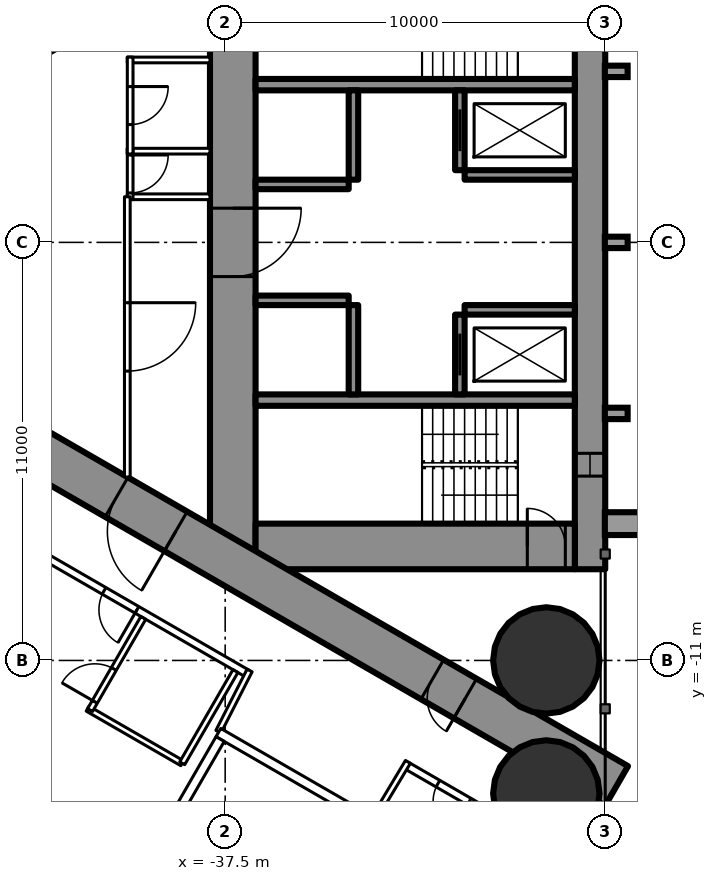
"""IFC4 building model, lengths in metres.
Left out: names, types, materials, properties, quantities, classifications, styles, units other than length and angle.
Written with IfcOpenShell. Run it as: python <this file> out.ifc"""

import sys

from ifc_helpers import new_model, si_unit, direction, frame, frame_2d, origin, origin_2d, place, context, subcontext, project, spatial, rectangle, hollow_circle, extrude, element, fill, save


model = new_model("IFC4")
c1 = context("Model", 3, precision=1e-05, world=origin(), true_north=direction((0.0, 1.0)))
c2 = subcontext(c1, "Body", "Model", "MODEL_VIEW")
j1 = project(units=[si_unit("LENGTHUNIT", "METRE"), si_unit("PLANEANGLEUNIT", "RADIAN")], contexts=[c1])
p1 = place(None, origin())
s1 = spatial("IfcSite", under=j1, at=p1, CompositionType="ELEMENT")
p2 = place(p1, origin())
s2 = spatial("IfcBuilding", under=s1, at=p2, CompositionType="ELEMENT")
p3 = place(p2, frame((0.0, 0.0, 56.5)))
s3 = spatial("IfcBuildingStorey", under=s2, at=p3, CompositionType="ELEMENT", Elevation=56.5)
for number, where, z_axis, x_axis in (
    (1, (-29.05, -11.0, 0.0), (0.0, 0.0, 1.0), (1.0, 0.0, 0.0)),
    (2, (-29.05, -14.5, 0.0), (0.0, 0.0, 1.0), (1.0, 0.0, 0.0)),
):
    element("IfcColumn", number, at=place(p3, frame(where, z_axis=z_axis, x_axis=x_axis)), inside=s3, PredefinedType="COLUMN", context=c2, shape_type="SweptSolid", body=[
        extrude(hollow_circle(Radius=1.4, WallThickness=0.12, at=origin_2d()), origin(), (0.0, 0.0, 1.0), 3.5),
    ])
p4 = place(p3, frame((-27.9, 8.6, 0.0), z_axis=(0.0, 0.0, 1.0), x_axis=(0.0, -1.0, 0.0)))
e3 = element("IfcWall", 3, at=p4, inside=s3, PredefinedType="SHEAR", context=c2, shape_type="SweptSolid", body=[
    extrude(rectangle(XDim=17.2, YDim=0.8, at=frame_2d((8.6, 0.0))), origin(), (0.0, 0.0, 1.0), 3.5),
])
p5 = place(p4, frame((2.45, 0.0, 0.6)))
e4 = element("IfcOpeningElement", 4, at=p5, cuts=e3, PredefinedType="OPENING", context=c2, shape_type="SweptSolid", body=[
    extrude(rectangle(XDim=0.6, YDim=2.1, at=frame_2d((0.3, 1.05))), frame((0.0, 0.41, 0.0), z_axis=(0.0, -1.0, 0.0), x_axis=(1.0, 0.0, 0.0)), (0.0, 0.0, 1.0), 0.82),
])
p6 = place(p4, frame((14.15, 0.0, 0.6)))
e5 = element("IfcOpeningElement", 5, at=p6, cuts=e3, PredefinedType="OPENING", context=c2, shape_type="SweptSolid", body=[
    extrude(rectangle(XDim=0.6, YDim=2.1, at=frame_2d((0.3, 1.05))), frame((0.0, 0.41, 0.0), z_axis=(0.0, -1.0, 0.0), x_axis=(1.0, 0.0, 0.0)), (0.0, 0.0, 1.0), 0.82),
])
p7 = place(p3, frame((-37.3, 8.6, 0.0), z_axis=(0.0, 0.0, 1.0), x_axis=(0.0, -1.0, 0.0)))
e6 = element("IfcWall", 6, at=p7, inside=s3, PredefinedType="SHEAR", context=c2, shape_type="SweptSolid", body=[
    extrude(rectangle(XDim=17.2, YDim=1.2, at=frame_2d((8.6, 0.0))), origin(), (0.0, 0.0, 1.0), 3.5),
])
p8 = place(p7, frame((7.7, 0.0, 0.0)))
e7 = element("IfcOpeningElement", 7, at=p8, cuts=e6, PredefinedType="OPENING", context=c2, shape_type="SweptSolid", body=[
    extrude(rectangle(XDim=1.8, YDim=2.2, at=frame_2d((0.9, 1.1))), frame((0.0, 0.61, 0.0), z_axis=(0.0, -1.0, 0.0), x_axis=(1.0, 0.0, 0.0)), (0.0, 0.0, 1.0), 1.22),
])
p9 = place(p3, frame((-28.3, -8.0, 0.0), z_axis=(0.0, 0.0, 1.0), x_axis=(-1.0, 0.0, 0.0)))
e8 = element("IfcWall", 8, at=p9, inside=s3, PredefinedType="SHEAR", context=c2, shape_type="SweptSolid", body=[
    extrude(rectangle(XDim=8.4, YDim=1.2, at=frame_2d((4.2, 0.0))), origin(), (0.0, 0.0, 1.0), 3.5),
])
p10 = place(p9, frame((0.25, 0.0, 0.0)))
e9 = element("IfcOpeningElement", 9, at=p10, cuts=e8, PredefinedType="OPENING", context=c2, shape_type="SweptSolid", body=[
    extrude(rectangle(XDim=1.0, YDim=2.2, at=frame_2d((0.5, 1.1))), frame((0.0, 0.61, 0.0), z_axis=(0.0, -1.0, 0.0), x_axis=(1.0, 0.0, 0.0)), (0.0, 0.0, 1.0), 1.22),
])
for number, where, z_axis, x_axis in (
    (10, (-28.3, 4.15, 0.0), (0.0, 0.0, 1.0), (-1.0, 0.0, 0.0)),
    (11, (-28.3, -4.15, 0.0), (0.0, 0.0, 1.0), (-1.0, 0.0, 0.0)),
):
    element("IfcWall", number, at=place(p3, frame(where, z_axis=z_axis, x_axis=x_axis)), inside=s3, PredefinedType="SHEAR", context=c2, shape_type="SweptSolid", body=[
        extrude(rectangle(XDim=8.4, YDim=0.3, at=frame_2d((4.2, 0.0))), origin(), (0.0, 0.0, 1.0), 3.5),
    ])
p11 = place(p3, frame((-31.325, 4.0, 0.0), z_axis=(0.0, 0.0, 1.0), x_axis=(0.0, -1.0, 0.0)))
e12 = element("IfcWall", 12, at=p11, inside=s3, PredefinedType="SHEAR", context=c2, shape_type="SweptSolid", body=[
    extrude(rectangle(XDim=2.1, YDim=0.25, at=frame_2d((1.05, 0.0))), origin(), (0.0, 0.0, 1.0), 3.5),
])
p12 = place(p11, frame((0.5, 0.0, 0.0)))
e13 = element("IfcOpeningElement", 13, at=p12, cuts=e12, PredefinedType="OPENING", context=c2, shape_type="SweptSolid", body=[
    extrude(rectangle(XDim=1.1, YDim=2.2, at=frame_2d((0.55, 1.1))), frame((0.0, 0.135, 0.0), z_axis=(0.0, -1.0, 0.0), x_axis=(1.0, 0.0, 0.0)), (0.0, 0.0, 1.0), 0.27),
])
p13 = place(p3, frame((-34.125, 4.0, 0.0), z_axis=(0.0, 0.0, 1.0), x_axis=(0.0, -1.0, 0.0)))
e14 = element("IfcWall", 14, at=p13, inside=s3, PredefinedType="SHEAR", context=c2, shape_type="SweptSolid", body=[
    extrude(rectangle(XDim=2.35, YDim=0.25, at=frame_2d((1.175, 0.0))), origin(), (0.0, 0.0, 1.0), 3.5),
])
p14 = place(p3, frame((-28.3, 1.775, 0.0), z_axis=(0.0, 0.0, 1.0), x_axis=(-1.0, 0.0, 0.0)))
e15 = element("IfcWall", 15, at=p14, inside=s3, PredefinedType="SHEAR", context=c2, shape_type="SweptSolid", body=[
    extrude(rectangle(XDim=2.9, YDim=0.25, at=frame_2d((1.45, 0.0))), origin(), (0.0, 0.0, 1.0), 3.5),
])
p15 = place(p3, frame((-34.25, 1.525, 0.0), z_axis=(0.0, 0.0, 1.0), x_axis=(-1.0, 0.0, 0.0)))
e16 = element("IfcWall", 16, at=p15, inside=s3, PredefinedType="SHEAR", context=c2, shape_type="SweptSolid", body=[
    extrude(rectangle(XDim=2.45, YDim=0.25, at=frame_2d((1.225, 0.0))), origin(), (0.0, 0.0, 1.0), 3.5),
])
p16 = place(p3, frame((-31.325, -1.9, 0.0), z_axis=(0.0, 0.0, 1.0), x_axis=(0.0, -1.0, 0.0)))
e17 = element("IfcWall", 17, at=p16, inside=s3, PredefinedType="SHEAR", context=c2, shape_type="SweptSolid", body=[
    extrude(rectangle(XDim=2.1, YDim=0.25, at=frame_2d((1.05, 0.0))), origin(), (0.0, 0.0, 1.0), 3.5),
])
p17 = place(p16, frame((0.5, 0.0, 0.0)))
e18 = element("IfcOpeningElement", 18, at=p17, cuts=e17, PredefinedType="OPENING", context=c2, shape_type="SweptSolid", body=[
    extrude(rectangle(XDim=1.1, YDim=2.2, at=frame_2d((0.55, 1.1))), frame((0.0, 0.135, 0.0), z_axis=(0.0, -1.0, 0.0), x_axis=(1.0, 0.0, 0.0)), (0.0, 0.0, 1.0), 0.27),
])
p18 = place(p3, frame((-34.125, -1.65, 0.0), z_axis=(0.0, 0.0, 1.0), x_axis=(0.0, -1.0, 0.0)))
e19 = element("IfcWall", 19, at=p18, inside=s3, PredefinedType="SHEAR", context=c2, shape_type="SweptSolid", body=[
    extrude(rectangle(XDim=2.35, YDim=0.25, at=frame_2d((1.175, 0.0))), origin(), (0.0, 0.0, 1.0), 3.5),
])
p19 = place(p3, frame((-28.3, -1.775, 0.0), z_axis=(0.0, 0.0, 1.0), x_axis=(-1.0, 0.0, 0.0)))
e20 = element("IfcWall", 20, at=p19, inside=s3, PredefinedType="SHEAR", context=c2, shape_type="SweptSolid", body=[
    extrude(rectangle(XDim=2.9, YDim=0.25, at=frame_2d((1.45, 0.0))), origin(), (0.0, 0.0, 1.0), 3.5),
])
p20 = place(p3, frame((-34.25, -1.525, 0.0), z_axis=(0.0, 0.0, 1.0), x_axis=(-1.0, 0.0, 0.0)))
e21 = element("IfcWall", 21, at=p20, inside=s3, PredefinedType="SHEAR", context=c2, shape_type="SweptSolid", body=[
    extrude(rectangle(XDim=2.45, YDim=0.25, at=frame_2d((1.225, 0.0))), origin(), (0.0, 0.0, 1.0), 3.5),
])
p21 = place(p3, frame((-27.2, 14.3, 0.0), z_axis=(0.0, 0.0, 1.0), x_axis=(-0.866026593062, -0.499997940104, 0.0)))
e22 = element("IfcWall", 22, at=p21, inside=s3, PredefinedType="SHEAR", context=c2, shape_type="SweptSolid", body=[
    extrude(rectangle(XDim=28.946, YDim=1.2, at=frame_2d((14.473, 0.0))), origin(), (0.0, 0.0, 1.0), 3.5),
])
p22 = place(p21, frame((4.6, 0.0, 0.0)))
e23 = element("IfcOpeningElement", 23, at=p22, cuts=e22, PredefinedType="OPENING", context=c2, shape_type="SweptSolid", body=[
    extrude(rectangle(XDim=1.0, YDim=2.2, at=frame_2d((0.5, 1.1))), frame((0.0, 0.61, 0.0), z_axis=(0.0, -1.0, 0.0), x_axis=(1.0, 0.0, 0.0)), (0.0, 0.0, 1.0), 1.22),
])
p23 = place(p21, frame((13.395, 0.0, 0.0)))
e24 = element("IfcOpeningElement", 24, at=p23, cuts=e22, PredefinedType="OPENING", context=c2, shape_type="SweptSolid", body=[
    extrude(rectangle(XDim=1.8, YDim=2.2, at=frame_2d((0.9, 1.1))), frame((0.0, 0.61, 0.0), z_axis=(0.0, -1.0, 0.0), x_axis=(1.0, 0.0, 0.0)), (0.0, 0.0, 1.0), 1.22),
])
p24 = place(p3, frame((-27.2, -14.3, 0.0), z_axis=(0.0, 0.0, 1.0), x_axis=(-0.866024021859, 0.500002393557, 0.0)))
e25 = element("IfcWall", 25, at=p24, inside=s3, PredefinedType="SHEAR", context=c2, shape_type="SweptSolid", body=[
    extrude(rectangle(XDim=27.907, YDim=1.2, at=frame_2d((13.954, 0.0))), origin(), (0.0, 0.0, 1.0), 3.5),
])
p25 = place(p24, frame((4.6, 0.0, 0.0)))
e26 = element("IfcOpeningElement", 26, at=p25, cuts=e25, PredefinedType="OPENING", context=c2, shape_type="SweptSolid", body=[
    extrude(rectangle(XDim=1.0, YDim=2.2, at=frame_2d((0.5, 1.1))), frame((0.0, 0.61, 0.0), z_axis=(0.0, -1.0, 0.0), x_axis=(1.0, 0.0, 0.0)), (0.0, 0.0, 1.0), 1.22),
])
p26 = place(p24, frame((13.395, 0.0, 0.0)))
e27 = element("IfcOpeningElement", 27, at=p26, cuts=e25, PredefinedType="OPENING", context=c2, shape_type="SweptSolid", body=[
    extrude(rectangle(XDim=1.8, YDim=2.2, at=frame_2d((0.9, 1.1))), frame((0.0, 0.61, 0.0), z_axis=(0.0, -1.0, 0.0), x_axis=(1.0, 0.0, 0.0)), (0.0, 0.0, 1.0), 1.22),
])
p27 = place(p3, frame((-37.7, 10.894, 0.0), z_axis=(0.0, 0.0, 1.0), x_axis=(-0.866027905338, -0.499995667157, 0.0)))
e28 = element("IfcWall", 28, at=p27, inside=s3, PredefinedType="PARTITIONING", context=c2, shape_type="SweptSolid", body=[
    extrude(rectangle(XDim=21.787, YDim=0.2, at=frame_2d((10.894, 0.0))), origin(), (0.0, 0.0, 1.0), 3.25),
])
p28 = place(p27, frame((20.237, 0.0, 0.0)))
e29 = element("IfcOpeningElement", 29, at=p28, cuts=e28, PredefinedType="OPENING", context=c2, shape_type="SweptSolid", body=[
    extrude(rectangle(XDim=0.95, YDim=2.2, at=frame_2d((0.475, 1.1))), frame((0.0, 0.11, 0.0), z_axis=(0.0, -1.0, 0.0), x_axis=(1.0, 0.0, 0.0)), (0.0, 0.0, 1.0), 0.22),
])
p29 = place(p27, frame((7.73, 0.0, 0.0)))
e30 = element("IfcOpeningElement", 30, at=p29, cuts=e28, PredefinedType="OPENING", context=c2, shape_type="SweptSolid", body=[
    extrude(rectangle(XDim=0.95, YDim=2.2, at=frame_2d((0.475, 1.1))), frame((0.0, 0.11, 0.0), z_axis=(0.0, -1.0, 0.0), x_axis=(1.0, 0.0, 0.0)), (0.0, 0.0, 1.0), 0.22),
])
p30 = place(p3, frame((-27.572, -16.741, 0.0), z_axis=(0.0, 0.0, 1.0), x_axis=(-0.866024464444, 0.500001626982, 0.0)))
e31 = element("IfcWall", 31, at=p30, inside=s3, PredefinedType="PARTITIONING", context=c2, shape_type="SweptSolid", body=[
    extrude(rectangle(XDim=5.955, YDim=0.2, at=frame_2d((2.978, 0.0))), origin(), (0.0, 0.0, 1.0), 3.25),
])
p31 = place(p30, frame((4.05, 0.0, 0.0)))
e32 = element("IfcOpeningElement", 32, at=p31, cuts=e31, PredefinedType="OPENING", context=c2, shape_type="SweptSolid", body=[
    extrude(rectangle(XDim=0.95, YDim=2.2, at=frame_2d((0.475, 1.1))), frame((0.0, 0.11, 0.0), z_axis=(0.0, -1.0, 0.0), x_axis=(1.0, 0.0, 0.0)), (0.0, 0.0, 1.0), 0.22),
])
p32 = place(p3, frame((-36.92, -11.344, 0.0), z_axis=(0.0, 0.0, 1.0), x_axis=(-0.866028313256, 0.499994960614, 0.0)))
e33 = element("IfcWall", 33, at=p32, inside=s3, PredefinedType="PARTITIONING", context=c2, shape_type="SweptSolid", body=[
    extrude(rectangle(XDim=22.568, YDim=0.2, at=frame_2d((11.284, 0.0))), origin(), (0.0, 0.0, 1.0), 3.25),
])
p33 = place(p32, frame((12.68, 0.0, 0.0)))
e34 = element("IfcOpeningElement", 34, at=p33, cuts=e33, PredefinedType="OPENING", context=c2, shape_type="SweptSolid", body=[
    extrude(rectangle(XDim=0.95, YDim=2.2, at=frame_2d((0.475, 1.1))), frame((0.0, 0.11, 0.0), z_axis=(0.0, -1.0, 0.0), x_axis=(1.0, 0.0, 0.0)), (0.0, 0.0, 1.0), 0.22),
])
p34 = place(p32, frame((3.35, 0.0, 0.0)))
e35 = element("IfcOpeningElement", 35, at=p34, cuts=e33, PredefinedType="OPENING", context=c2, shape_type="SweptSolid", body=[
    extrude(rectangle(XDim=1.0, YDim=2.2, at=frame_2d((0.5, 1.1))), frame((0.0, 0.11, 0.0), z_axis=(0.0, -1.0, 0.0), x_axis=(1.0, 0.0, 0.0)), (0.0, 0.0, 1.0), 0.22),
])
p35 = place(p3, frame((-36.857, -11.265, 0.0), z_axis=(0.0, 0.0, 1.0), x_axis=(-0.454225294761, -0.890886851176, 0.0)))
e36 = element("IfcWall", 36, at=p35, inside=s3, PredefinedType="PARTITIONING", context=c2, shape_type="SweptSolid", body=[
    extrude(rectangle(XDim=1.807, YDim=0.15, at=frame_2d((0.904, 0.0))), origin(), (0.0, 0.0, 1.0), 3.25),
])
p36 = place(p3, frame((-33.621, -15.218, 0.0), z_axis=(0.0, 0.0, 1.0), x_axis=(0.514336634837, 0.857588377991, 0.0)))
e37 = element("IfcWall", 37, at=p36, inside=s3, PredefinedType="PARTITIONING", context=c2, shape_type="SweptSolid", body=[
    extrude(rectangle(XDim=1.805, YDim=0.15, at=frame_2d((0.903, 0.0))), origin(), (0.0, 0.0, 1.0), 3.25),
])
p37 = place(p3, frame((-38.63, -13.705, 0.0), z_axis=(0.0, 0.0, 1.0), x_axis=(-0.866018712932, 0.500011588718, 0.0)))
e38 = element("IfcWall", 38, at=p37, inside=s3, PredefinedType="PARTITIONING", context=c2, shape_type="SweptSolid", body=[
    extrude(rectangle(XDim=2.875, YDim=0.15, at=frame_2d((1.438, 0.0))), origin(), (0.0, 0.0, 1.0), 3.25),
])
p38 = place(p3, frame((-39.655, -9.88, 0.0), z_axis=(0.0, 0.0, 1.0), x_axis=(-0.500049511043, -0.865996816683, 0.0)))
e39 = element("IfcWall", 39, at=p38, inside=s3, PredefinedType="PARTITIONING", context=c2, shape_type="SweptSolid", body=[
    extrude(rectangle(XDim=2.8, YDim=0.15, at=frame_2d((1.4, 0.0))), origin(), (0.0, 0.0, 1.0), 3.25),
])
p39 = place(p38, frame((1.55, 0.0, 0.0)))
e40 = element("IfcOpeningElement", 40, at=p39, cuts=e39, PredefinedType="OPENING", context=c2, shape_type="SweptSolid", body=[
    extrude(rectangle(XDim=1.0, YDim=2.2, at=frame_2d((0.5, 1.1))), frame((0.0, 0.085, 0.0), z_axis=(0.0, -1.0, 0.0), x_axis=(1.0, 0.0, 0.0)), (0.0, 0.0, 1.0), 0.17),
])
p40 = place(p3, frame((-37.23, -11.281, 0.0), z_axis=(0.0, 0.0, 1.0), x_axis=(-0.500049511043, -0.865996816683, 0.0)))
e41 = element("IfcWall", 41, at=p40, inside=s3, PredefinedType="PARTITIONING", context=c2, shape_type="SweptSolid", body=[
    extrude(rectangle(XDim=2.8, YDim=0.15, at=frame_2d((1.4, 0.0))), origin(), (0.0, 0.0, 1.0), 3.25),
])
for number, where, z_axis, x_axis in (
    (42, (-37.9, 1.2, 0.0), (0.0, 0.0, 1.0), (-1.0, 0.0, 0.0)),
    (43, (-37.9, 2.4, 0.0), (0.0, 0.0, 1.0), (-1.0, 0.0, 0.0)),
    (44, (-37.9, 4.8, 0.0), (0.0, 0.0, 1.0), (-1.0, 0.0, 0.0)),
):
    element("IfcWall", number, at=place(p3, frame(where, z_axis=z_axis, x_axis=x_axis)), inside=s3, PredefinedType="PARTITIONING", context=c2, shape_type="SweptSolid", body=[
        extrude(rectangle(XDim=2.175, YDim=0.15, at=frame_2d((1.087, 0.0))), origin(), (0.0, 0.0, 1.0), 3.25),
    ])
p41 = place(p3, frame((-40.0, 2.475, 0.0), z_axis=(0.0, 0.0, 1.0), x_axis=(0.0, -1.0, 0.0)))
e45 = element("IfcWall", 45, at=p41, inside=s3, PredefinedType="PARTITIONING", context=c2, shape_type="SweptSolid", body=[
    extrude(rectangle(XDim=1.35, YDim=0.15, at=frame_2d((0.675, 0.0))), origin(), (0.0, 0.0, 1.0), 3.25),
])
p42 = place(p41, frame((0.175, 0.0, 0.0)))
e46 = element("IfcOpeningElement", 46, at=p42, cuts=e45, PredefinedType="OPENING", context=c2, shape_type="SweptSolid", body=[
    extrude(rectangle(XDim=1.0, YDim=2.2, at=frame_2d((0.5, 1.1))), frame((0.0, 0.085, 0.0), z_axis=(0.0, -1.0, 0.0), x_axis=(1.0, 0.0, 0.0)), (0.0, 0.0, 1.0), 0.17),
])
p43 = place(p3, frame((-40.0, 4.875, 0.0), z_axis=(0.0, 0.0, 1.0), x_axis=(0.0, -1.0, 0.0)))
e47 = element("IfcWall", 47, at=p43, inside=s3, PredefinedType="PARTITIONING", context=c2, shape_type="SweptSolid", body=[
    extrude(rectangle(XDim=2.55, YDim=0.15, at=frame_2d((1.275, 0.0))), origin(), (0.0, 0.0, 1.0), 3.25),
])
p44 = place(p43, frame((0.775, 0.0, 0.0)))
e48 = element("IfcOpeningElement", 48, at=p44, cuts=e47, PredefinedType="OPENING", context=c2, shape_type="SweptSolid", body=[
    extrude(rectangle(XDim=1.0, YDim=2.2, at=frame_2d((0.5, 1.1))), frame((0.0, 0.085, 0.0), z_axis=(0.0, -1.0, 0.0), x_axis=(1.0, 0.0, 0.0)), (0.0, 0.0, 1.0), 0.17),
])
p45 = place(p3, frame((-40.075, 1.2, 0.0), z_axis=(0.0, 0.0, 1.0), x_axis=(0.0, -1.0, 0.0)))
e49 = element("IfcWall", 49, at=p45, inside=s3, PredefinedType="PARTITIONING", context=c2, shape_type="SweptSolid", body=[
    extrude(rectangle(XDim=7.374, YDim=0.15, at=frame_2d((3.687, 0.0))), origin(), (0.0, 0.0, 1.0), 3.25),
])
p46 = place(p45, frame((2.787, 0.0, 0.0)))
e50 = element("IfcOpeningElement", 50, at=p46, cuts=e49, PredefinedType="OPENING", context=c2, shape_type="SweptSolid", body=[
    extrude(rectangle(XDim=1.8, YDim=2.2, at=frame_2d((0.9, 1.1))), frame((0.0, 0.085, 0.0), z_axis=(0.0, -1.0, 0.0), x_axis=(1.0, 0.0, 0.0)), (0.0, 0.0, 1.0), 0.17),
])
p47 = place(p3, frame((-33.696, -15.197, 0.0), z_axis=(0.0, 0.0, 1.0), x_axis=(-0.865976953817, 0.500083908417, 0.0)))
e51 = element("IfcWall", 51, at=p47, inside=s3, PredefinedType="PARTITIONING", context=c2, shape_type="SweptSolid", body=[
    extrude(rectangle(XDim=4.599, YDim=0.25, at=frame_2d((2.3, 0.0))), origin(), (0.0, 0.0, 1.0), 3.25),
])
p48 = place(p3, frame((-37.633, -13.068, 0.0), z_axis=(0.0, 0.0, 1.0), x_axis=(-0.499872130319, -0.866099216793, 0.0)))
e52 = element("IfcWall", 52, at=p48, inside=s3, PredefinedType="PARTITIONING", context=c2, shape_type="SweptSolid", body=[
    extrude(rectangle(XDim=3.2, YDim=0.25, at=frame_2d((1.6, 0.0))), origin(), (0.0, 0.0, 1.0), 3.25),
])
p49 = place(p39, origin())
e53 = element("IfcDoor", 53, at=p49, inside=s3, OperationType="SINGLE_SWING_RIGHT", PredefinedType="DOOR", context=c2, shape_type="SweptSolid", body=[
    extrude(rectangle(XDim=1.0, YDim=2.2, at=frame_2d((0.5, 1.1))), frame((0.0, 0.025, 0.0), z_axis=(0.0, -1.0, 0.0), x_axis=(1.0, 0.0, 0.0)), (0.0, 0.0, 1.0), 0.05),
])
fill(e40, e53)
p50 = place(p34, origin())
e54 = element("IfcDoor", 54, at=p50, inside=s3, OperationType="SINGLE_SWING_LEFT", PredefinedType="DOOR", context=c2, shape_type="SweptSolid", body=[
    extrude(rectangle(XDim=1.0, YDim=2.2, at=frame_2d((0.5, 1.1))), frame((0.0, 0.025, 0.0), z_axis=(0.0, -1.0, 0.0), x_axis=(1.0, 0.0, 0.0)), (0.0, 0.0, 1.0), 0.05),
])
fill(e35, e54)
p51 = place(p31, origin())
e55 = element("IfcDoor", 55, at=p51, inside=s3, OperationType="SINGLE_SWING_LEFT", PredefinedType="DOOR", context=c2, shape_type="SweptSolid", body=[
    extrude(rectangle(XDim=0.95, YDim=2.2, at=frame_2d((0.475, 1.1))), frame((0.0, 0.025, 0.0), z_axis=(0.0, -1.0, 0.0), x_axis=(1.0, 0.0, 0.0)), (0.0, 0.0, 1.0), 0.05),
])
fill(e32, e55)
p52 = place(p42, origin())
e56 = element("IfcDoor", 56, at=p52, inside=s3, OperationType="SINGLE_SWING_LEFT", PredefinedType="DOOR", context=c2, shape_type="SweptSolid", body=[
    extrude(rectangle(XDim=1.0, YDim=2.2, at=frame_2d((0.5, 1.1))), frame((0.0, 0.025, 0.0), z_axis=(0.0, -1.0, 0.0), x_axis=(1.0, 0.0, 0.0)), (0.0, 0.0, 1.0), 0.05),
])
fill(e46, e56)
p53 = place(p44, origin())
e57 = element("IfcDoor", 57, at=p53, inside=s3, OperationType="SINGLE_SWING_LEFT", PredefinedType="DOOR", context=c2, shape_type="SweptSolid", body=[
    extrude(rectangle(XDim=1.0, YDim=2.2, at=frame_2d((0.5, 1.1))), frame((0.0, 0.025, 0.0), z_axis=(0.0, -1.0, 0.0), x_axis=(1.0, 0.0, 0.0)), (0.0, 0.0, 1.0), 0.05),
])
fill(e48, e57)
p54 = place(p46, origin())
e58 = element("IfcDoor", 58, at=p54, inside=s3, OperationType="DOUBLE_DOOR_SINGLE_SWING", PredefinedType="DOOR", context=c2, shape_type="SweptSolid", body=[
    extrude(rectangle(XDim=1.8, YDim=2.2, at=frame_2d((0.9, 1.1))), frame((0.0, 0.025, 0.0), z_axis=(0.0, -1.0, 0.0), x_axis=(1.0, 0.0, 0.0)), (0.0, 0.0, 1.0), 0.05),
])
fill(e50, e58)
p55 = place(p25, origin())
e59 = element("IfcDoor", 59, at=p55, inside=s3, OperationType="SINGLE_SWING_LEFT", PredefinedType="DOOR", context=c2, shape_type="SweptSolid", body=[
    extrude(rectangle(XDim=1.0, YDim=2.2, at=frame_2d((0.5, 1.1))), frame((0.0, 0.025, 0.0), z_axis=(0.0, -1.0, 0.0), x_axis=(1.0, 0.0, 0.0)), (0.0, 0.0, 1.0), 0.05),
])
fill(e26, e59)
p56 = place(p26, origin())
e60 = element("IfcDoor", 60, at=p56, inside=s3, OperationType="DOUBLE_DOOR_SINGLE_SWING", PredefinedType="DOOR", context=c2, shape_type="SweptSolid", body=[
    extrude(rectangle(XDim=1.8, YDim=2.2, at=frame_2d((0.9, 1.1))), frame((0.0, 0.025, 0.0), z_axis=(0.0, -1.0, 0.0), x_axis=(1.0, 0.0, 0.0)), (0.0, 0.0, 1.0), 0.05),
])
fill(e27, e60)
p57 = place(p8, origin())
e61 = element("IfcDoor", 61, at=p57, inside=s3, OperationType="DOUBLE_DOOR_SINGLE_SWING", PredefinedType="DOOR", context=c2, shape_type="SweptSolid", body=[
    extrude(rectangle(XDim=1.8, YDim=2.2, at=frame_2d((0.9, 1.1))), frame((0.0, 0.025, 0.0), z_axis=(0.0, -1.0, 0.0), x_axis=(1.0, 0.0, 0.0)), (0.0, 0.0, 1.0), 0.05),
])
fill(e7, e61)
p58 = place(p10, origin())
e62 = element("IfcDoor", 62, at=p58, inside=s3, OperationType="SINGLE_SWING_RIGHT", PredefinedType="DOOR", context=c2, shape_type="SweptSolid", body=[
    extrude(rectangle(XDim=1.0, YDim=2.2, at=frame_2d((0.5, 1.1))), frame((0.0, 0.025, 0.0), z_axis=(0.0, -1.0, 0.0), x_axis=(1.0, 0.0, 0.0)), (0.0, 0.0, 1.0), 0.05),
])
fill(e9, e62)
p59 = place(p12, origin())
e63 = element("IfcDoor", 63, at=p59, inside=s3, OperationType="SLIDING_TO_LEFT", PredefinedType="USERDEFINED", context=c2, shape_type="SweptSolid", body=[
    extrude(rectangle(XDim=1.1, YDim=2.2, at=frame_2d((0.55, 1.1))), frame((0.0, 0.025, 0.0), z_axis=(0.0, -1.0, 0.0), x_axis=(1.0, 0.0, 0.0)), (0.0, 0.0, 1.0), 0.05),
])
fill(e13, e63)
p60 = place(p17, origin())
e64 = element("IfcDoor", 64, at=p60, inside=s3, OperationType="SLIDING_TO_LEFT", PredefinedType="USERDEFINED", context=c2, shape_type="SweptSolid", body=[
    extrude(rectangle(XDim=1.1, YDim=2.2, at=frame_2d((0.55, 1.1))), frame((0.0, 0.025, 0.0), z_axis=(0.0, -1.0, 0.0), x_axis=(1.0, 0.0, 0.0)), (0.0, 0.0, 1.0), 0.05),
])
fill(e18, e64)
p61 = place(p6, origin())
e65 = element("IfcWindow", 65, at=p61, inside=s3, PartitioningType="SINGLE_PANEL", PredefinedType="WINDOW", context=c2, shape_type="SweptSolid", body=[
    extrude(rectangle(XDim=0.6, YDim=2.1, at=frame_2d((0.3, 1.05))), frame((0.0, 0.03, 0.0), z_axis=(0.0, -1.0, 0.0), x_axis=(1.0, 0.0, 0.0)), (0.0, 0.0, 1.0), 0.06),
])
fill(e5, e65)
save(model, sys.argv[1])
